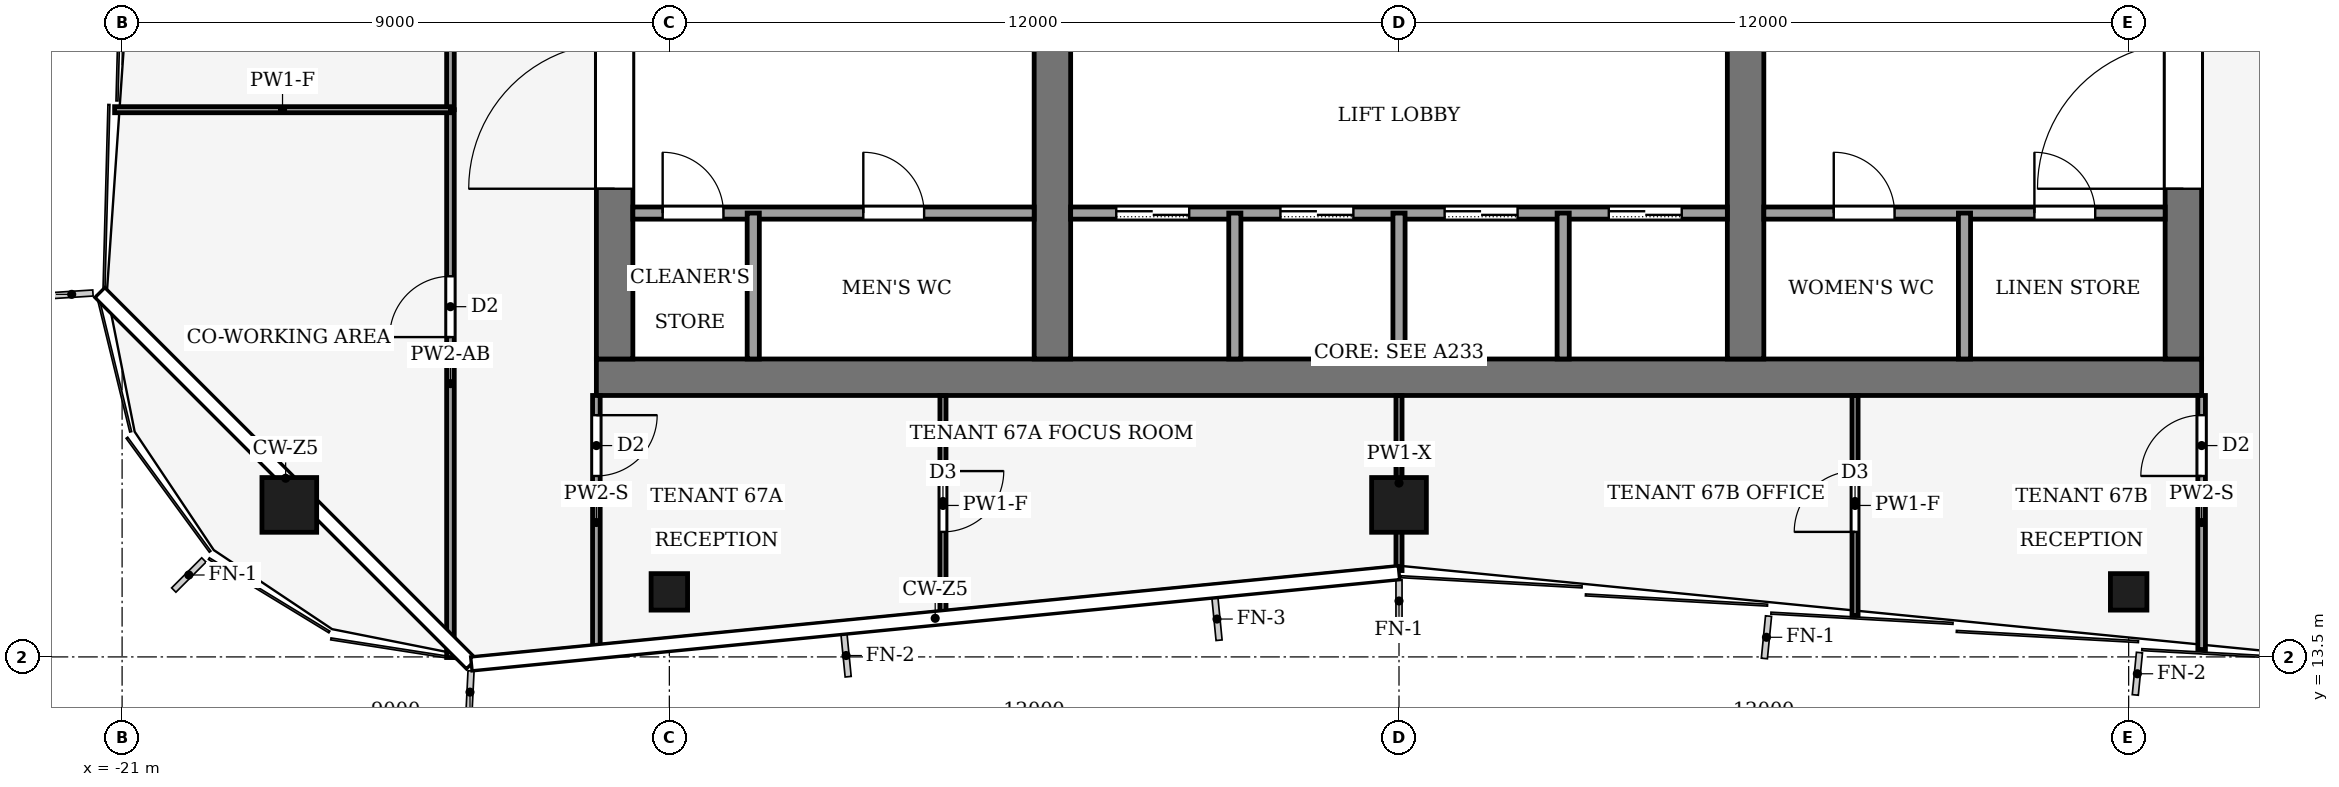
"""IFC4 building model, lengths in metres.
Left out: names, types, materials, properties, quantities, classifications, styles, units other than length and angle.
Written with IfcOpenShell. Run it as: python <this file> out.ifc"""

import sys

from ifc_helpers import new_model, si_unit, direction, frame, frame_2d, origin, origin_2d, place, context, subcontext, project, spatial, rectangle, hollow_rectangle, extrude, element, fill, save


model = new_model("IFC4")
c1 = context("Model", 3, precision=1e-05, world=origin(), true_north=direction((0.0, 1.0)))
c2 = subcontext(c1, "Body", "Model", "MODEL_VIEW")
j1 = project(units=[si_unit("LENGTHUNIT", "METRE"), si_unit("PLANEANGLEUNIT", "RADIAN")], contexts=[c1])
p1 = place(None, origin())
s1 = spatial("IfcSite", under=j1, at=p1, CompositionType="ELEMENT")
p2 = place(p1, origin())
s2 = spatial("IfcBuilding", under=s1, at=p2, CompositionType="ELEMENT")
p3 = place(p2, frame((0.0, 0.0, 294.0)))
s3 = spatial("IfcBuildingStorey", under=s2, at=p3, CompositionType="ELEMENT", Elevation=294.0)
p4 = place(p3, frame((-13.2, 18.1, -0.13), z_axis=(0.0, 0.0, 1.0), x_axis=(1.0, 0.0, 0.0)))
e1 = element("IfcWall", 1, at=p4, inside=s3, PredefinedType="SHEAR", context=c2, shape_type="SweptSolid", body=[
    extrude(rectangle(XDim=26.4, YDim=0.6, at=frame_2d((13.2, 0.0))), origin(), (0.0, 0.0, 1.0), 4.0),
])
p5 = place(p3, frame((-12.9, 18.4, -0.13), z_axis=(0.0, 0.0, 1.0), x_axis=(0.0, 1.0, 0.0)))
e2 = element("IfcWall", 2, at=p5, inside=s3, PredefinedType="SHEAR", context=c2, shape_type="SweptSolid", body=[
    extrude(rectangle(XDim=19.2, YDim=0.6, at=frame_2d((9.6, 0.0))), origin(), (0.0, 0.0, 1.0), 4.0),
])
p6 = place(p5, frame((2.8, 0.0, 0.13)))
e3 = element("IfcOpeningElement", 3, at=p6, cuts=e2, PredefinedType="OPENING", context=c2, shape_type="SweptSolid", body=[
    extrude(rectangle(XDim=2.4, YDim=2.4, at=frame_2d((1.2, 1.2))), frame((0.0, 0.31, 0.0), z_axis=(0.0, -1.0, 0.0), x_axis=(1.0, 0.0, 0.0)), (0.0, 0.0, 1.0), 0.62),
])
p7 = place(p5, frame((13.4, 0.0, 0.13)))
e4 = element("IfcOpeningElement", 4, at=p7, cuts=e2, PredefinedType="OPENING", context=c2, shape_type="SweptSolid", body=[
    extrude(rectangle(XDim=1.4, YDim=2.2, at=frame_2d((0.7, 1.1))), frame((0.0, 0.31, 0.0), z_axis=(0.0, -1.0, 0.0), x_axis=(1.0, 0.0, 0.0)), (0.0, 0.0, 1.0), 0.62),
])
p8 = place(p3, frame((12.9, 18.4, -0.13), z_axis=(0.0, 0.0, 1.0), x_axis=(0.0, 1.0, 0.0)))
e5 = element("IfcWall", 5, at=p8, inside=s3, PredefinedType="SHEAR", context=c2, shape_type="SweptSolid", body=[
    extrude(rectangle(XDim=19.2, YDim=0.6, at=frame_2d((9.6, 0.0))), origin(), (0.0, 0.0, 1.0), 4.0),
])
p9 = place(p8, frame((2.8, 0.0, 0.13)))
e6 = element("IfcOpeningElement", 6, at=p9, cuts=e5, PredefinedType="OPENING", context=c2, shape_type="SweptSolid", body=[
    extrude(rectangle(XDim=2.4, YDim=2.4, at=frame_2d((1.2, 1.2))), frame((0.0, 0.31, 0.0), z_axis=(0.0, -1.0, 0.0), x_axis=(1.0, 0.0, 0.0)), (0.0, 0.0, 1.0), 0.62),
])
p10 = place(p8, frame((13.3, 0.0, 0.13)))
e7 = element("IfcOpeningElement", 7, at=p10, cuts=e5, PredefinedType="OPENING", context=c2, shape_type="SweptSolid", body=[
    extrude(rectangle(XDim=2.4, YDim=2.4, at=frame_2d((1.2, 1.2))), frame((0.0, 0.31, 0.0), z_axis=(0.0, -1.0, 0.0), x_axis=(1.0, 0.0, 0.0)), (0.0, 0.0, 1.0), 0.62),
])
p11 = place(p3, frame((-5.7, 18.4, -0.13), z_axis=(0.0, 0.0, 1.0), x_axis=(0.0, 1.0, 0.0)))
e8 = element("IfcWall", 8, at=p11, inside=s3, PredefinedType="SHEAR", context=c2, shape_type="SweptSolid", body=[
    extrude(rectangle(XDim=19.2, YDim=0.6, at=frame_2d((9.6, 0.0))), origin(), (0.0, 0.0, 1.0), 4.0),
])
p12 = place(p11, frame((8.35, 0.0, 0.13)))
e9 = element("IfcOpeningElement", 9, at=p12, cuts=e8, PredefinedType="OPENING", context=c2, shape_type="SweptSolid", body=[
    extrude(rectangle(XDim=0.9, YDim=2.1, at=frame_2d((0.45, 1.05))), frame((0.0, 0.31, 0.0), z_axis=(0.0, -1.0, 0.0), x_axis=(1.0, 0.0, 0.0)), (0.0, 0.0, 1.0), 0.62),
])
p13 = place(p3, frame((5.7, 18.4, -0.13), z_axis=(0.0, 0.0, 1.0), x_axis=(0.0, 1.0, 0.0)))
e10 = element("IfcWall", 10, at=p13, inside=s3, PredefinedType="SHEAR", context=c2, shape_type="SweptSolid", body=[
    extrude(rectangle(XDim=19.2, YDim=0.6, at=frame_2d((9.6, 0.0))), origin(), (0.0, 0.0, 1.0), 4.0),
])
p14 = place(p13, frame((13.3, 0.0, 0.13)))
e11 = element("IfcOpeningElement", 11, at=p14, cuts=e10, PredefinedType="OPENING", context=c2, shape_type="SweptSolid", body=[
    extrude(rectangle(XDim=2.4, YDim=2.4, at=frame_2d((1.2, 1.2))), frame((0.0, 0.31, 0.0), z_axis=(0.0, -1.0, 0.0), x_axis=(1.0, 0.0, 0.0)), (0.0, 0.0, 1.0), 0.62),
])
for number, where, z_axis, x_axis in (
    (12, (0.0, 16.0, 0.0), (0.0, 0.0, 1.0), (1.0, 0.0, 0.0)),
    (13, (-18.25, 16.0, 0.0), (0.0, 0.0, 1.0), (1.0, 0.0, 0.0)),
):
    element("IfcColumn", number, at=place(p3, frame(where, z_axis=z_axis, x_axis=x_axis)), inside=s3, PredefinedType="COLUMN", context=c2, shape_type="SweptSolid", body=[
        extrude(hollow_rectangle(XDim=0.9, YDim=0.9, WallThickness=0.04, at=origin_2d()), origin(), (0.0, 0.0, 1.0), 4.0),
    ])
for number, where, z_axis, x_axis in (
    (14, (-12.0, 14.57, 0.0), (0.0, 0.0, 1.0), (1.0, 0.0, 0.0)),
    (15, (12.0, 14.57, 0.0), (0.0, 0.0, 1.0), (1.0, 0.0, 0.0)),
):
    element("IfcColumn", number, at=place(p3, frame(where, z_axis=z_axis, x_axis=x_axis)), inside=s3, PredefinedType="COLUMN", context=c2, shape_type="SweptSolid", body=[
        extrude(hollow_rectangle(XDim=0.6, YDim=0.6, WallThickness=0.025, at=origin_2d()), origin(), (0.0, 0.0, 1.0), 4.0),
    ])
p15 = place(p3, frame((-12.6, 20.8, 0.0), z_axis=(0.0, 0.0, 1.0), x_axis=(1.0, 0.0, 0.0)))
e16 = element("IfcWall", 16, at=p15, inside=s3, PredefinedType="PARTITIONING", context=c2, shape_type="SweptSolid", body=[
    extrude(rectangle(XDim=6.6, YDim=0.2, at=frame_2d((3.3, 0.0))), origin(), (0.0, 0.0, 1.0), 3.87),
])
p16 = place(p15, frame((0.49, 0.0, 0.0)))
e17 = element("IfcOpeningElement", 17, at=p16, cuts=e16, PredefinedType="OPENING", context=c2, shape_type="SweptSolid", body=[
    extrude(rectangle(XDim=1.0, YDim=2.1, at=frame_2d((0.5, 1.05))), frame((0.0, 0.11, 0.0), z_axis=(0.0, -1.0, 0.0), x_axis=(1.0, 0.0, 0.0)), (0.0, 0.0, 1.0), 0.22),
])
p17 = place(p15, frame((3.79, 0.0, 0.0)))
e18 = element("IfcOpeningElement", 18, at=p17, cuts=e16, PredefinedType="OPENING", context=c2, shape_type="SweptSolid", body=[
    extrude(rectangle(XDim=1.0, YDim=2.1, at=frame_2d((0.5, 1.05))), frame((0.0, 0.11, 0.0), z_axis=(0.0, -1.0, 0.0), x_axis=(1.0, 0.0, 0.0)), (0.0, 0.0, 1.0), 0.22),
])
p18 = place(p3, frame((-5.4, 20.8, 0.0), z_axis=(0.0, 0.0, 1.0), x_axis=(1.0, 0.0, 0.0)))
e19 = element("IfcWall", 19, at=p18, inside=s3, PredefinedType="PARTITIONING", context=c2, shape_type="SweptSolid", body=[
    extrude(rectangle(XDim=10.8, YDim=0.2, at=frame_2d((5.4, 0.0))), origin(), (0.0, 0.0, 1.0), 3.87),
])
p19 = place(p18, frame((0.75, 0.0, 0.0)))
e20 = element("IfcOpeningElement", 20, at=p19, cuts=e19, PredefinedType="OPENING", context=c2, shape_type="SweptSolid", body=[
    extrude(rectangle(XDim=1.2, YDim=2.2, at=frame_2d((0.6, 1.1))), frame((0.0, 0.11, 0.0), z_axis=(0.0, -1.0, 0.0), x_axis=(1.0, 0.0, 0.0)), (0.0, 0.0, 1.0), 0.22),
])
p20 = place(p18, frame((3.45, 0.0, 0.0)))
e21 = element("IfcOpeningElement", 21, at=p20, cuts=e19, PredefinedType="OPENING", context=c2, shape_type="SweptSolid", body=[
    extrude(rectangle(XDim=1.2, YDim=2.2, at=frame_2d((0.6, 1.1))), frame((0.0, 0.11, 0.0), z_axis=(0.0, -1.0, 0.0), x_axis=(1.0, 0.0, 0.0)), (0.0, 0.0, 1.0), 0.22),
])
p21 = place(p18, frame((6.15, 0.0, 0.0)))
e22 = element("IfcOpeningElement", 22, at=p21, cuts=e19, PredefinedType="OPENING", context=c2, shape_type="SweptSolid", body=[
    extrude(rectangle(XDim=1.2, YDim=2.2, at=frame_2d((0.6, 1.1))), frame((0.0, 0.11, 0.0), z_axis=(0.0, -1.0, 0.0), x_axis=(1.0, 0.0, 0.0)), (0.0, 0.0, 1.0), 0.22),
])
p22 = place(p18, frame((8.85, 0.0, 0.0)))
e23 = element("IfcOpeningElement", 23, at=p22, cuts=e19, PredefinedType="OPENING", context=c2, shape_type="SweptSolid", body=[
    extrude(rectangle(XDim=1.2, YDim=2.2, at=frame_2d((0.6, 1.1))), frame((0.0, 0.11, 0.0), z_axis=(0.0, -1.0, 0.0), x_axis=(1.0, 0.0, 0.0)), (0.0, 0.0, 1.0), 0.22),
])
p23 = place(p3, frame((6.0, 20.8, 0.0), z_axis=(0.0, 0.0, 1.0), x_axis=(1.0, 0.0, 0.0)))
e24 = element("IfcWall", 24, at=p23, inside=s3, PredefinedType="PARTITIONING", context=c2, shape_type="SweptSolid", body=[
    extrude(rectangle(XDim=6.6, YDim=0.2, at=frame_2d((3.3, 0.0))), origin(), (0.0, 0.0, 1.0), 3.87),
])
p24 = place(p23, frame((1.15, 0.0, 0.0)))
e25 = element("IfcOpeningElement", 25, at=p24, cuts=e24, PredefinedType="OPENING", context=c2, shape_type="SweptSolid", body=[
    extrude(rectangle(XDim=1.0, YDim=2.1, at=frame_2d((0.5, 1.05))), frame((0.0, 0.11, 0.0), z_axis=(0.0, -1.0, 0.0), x_axis=(1.0, 0.0, 0.0)), (0.0, 0.0, 1.0), 0.22),
])
p25 = place(p23, frame((4.45, 0.0, 0.0)))
e26 = element("IfcOpeningElement", 26, at=p25, cuts=e24, PredefinedType="OPENING", context=c2, shape_type="SweptSolid", body=[
    extrude(rectangle(XDim=1.0, YDim=2.1, at=frame_2d((0.5, 1.05))), frame((0.0, 0.11, 0.0), z_axis=(0.0, -1.0, 0.0), x_axis=(1.0, 0.0, 0.0)), (0.0, 0.0, 1.0), 0.22),
])
for number, where, z_axis, x_axis in (
    (27, (-10.62, 18.4, 0.0), (0.0, 0.0, 1.0), (0.0, 1.0, 0.0)),
    (28, (-2.7, 18.4, 0.0), (0.0, 0.0, 1.0), (0.0, 1.0, 0.0)),
    (29, (0.0, 18.4, 0.0), (0.0, 0.0, 1.0), (0.0, 1.0, 0.0)),
    (30, (2.7, 18.4, 0.0), (0.0, 0.0, 1.0), (0.0, 1.0, 0.0)),
    (31, (9.3, 18.4, 0.0), (0.0, 0.0, 1.0), (0.0, 1.0, 0.0)),
):
    element("IfcWall", number, at=place(p3, frame(where, z_axis=z_axis, x_axis=x_axis)), inside=s3, PredefinedType="PARTITIONING", context=c2, shape_type="SweptSolid", body=[
        extrude(rectangle(XDim=2.4, YDim=0.2, at=frame_2d((1.2, 0.0))), origin(), (0.0, 0.0, 1.0), 3.87),
    ])
p26 = place(p3, frame((-15.6, 13.49, 0.0), z_axis=(0.0, 0.0, 1.0), x_axis=(0.0, 1.0, 0.0)))
e32 = element("IfcWall", 32, at=p26, inside=s3, PredefinedType="PARTITIONING", context=c2, shape_type="SweptSolid", body=[
    extrude(rectangle(XDim=9.01, YDim=0.125, at=frame_2d((4.505, 0.0))), origin(), (0.0, 0.0, 1.0), 2.93),
])
p27 = place(p26, frame((5.271, 0.0, 0.0)))
e33 = element("IfcOpeningElement", 33, at=p27, cuts=e32, PredefinedType="OPENING", context=c2, shape_type="SweptSolid", body=[
    extrude(rectangle(XDim=1.0, YDim=2.1, at=frame_2d((0.5, 1.05))), frame((0.0, 0.073, 0.0), z_axis=(0.0, -1.0, 0.0), x_axis=(1.0, 0.0, 0.0)), (0.0, 0.0, 1.0), 0.145),
])
p28 = place(p3, frame((-15.6, 22.5, 0.0), z_axis=(0.0, 0.0, 1.0), x_axis=(0.0, 1.0, 0.0)))
e34 = element("IfcWall", 34, at=p28, inside=s3, PredefinedType="PARTITIONING", context=c2, shape_type="SweptSolid", body=[
    extrude(rectangle(XDim=12.0, YDim=0.125, at=frame_2d((6.0, 0.0))), origin(), (0.0, 0.0, 1.0), 3.54),
])
p29 = place(p28, frame((5.5, 0.0, 0.0)))
e35 = element("IfcOpeningElement", 35, at=p29, cuts=e34, PredefinedType="OPENING", context=c2, shape_type="SweptSolid", body=[
    extrude(rectangle(XDim=1.0, YDim=2.1, at=frame_2d((0.5, 1.05))), frame((0.0, 0.073, 0.0), z_axis=(0.0, -1.0, 0.0), x_axis=(1.0, 0.0, 0.0)), (0.0, 0.0, 1.0), 0.145),
])
p30 = place(p3, frame((-13.2, 17.8, 0.0), z_axis=(0.0, 0.0, 1.0), x_axis=(0.0, -1.0, 0.0)))
e36 = element("IfcWall", 36, at=p30, inside=s3, PredefinedType="PARTITIONING", context=c2, shape_type="SweptSolid", body=[
    extrude(rectangle(XDim=4.178, YDim=0.125, at=frame_2d((2.089, 0.0))), origin(), (0.0, 0.0, 1.0), 3.04),
])
p31 = place(p30, frame((0.324, 0.0, 0.0)))
e37 = element("IfcOpeningElement", 37, at=p31, cuts=e36, PredefinedType="OPENING", context=c2, shape_type="SweptSolid", body=[
    extrude(rectangle(XDim=1.0, YDim=2.1, at=frame_2d((0.5, 1.05))), frame((0.0, 0.073, 0.0), z_axis=(0.0, -1.0, 0.0), x_axis=(1.0, 0.0, 0.0)), (0.0, 0.0, 1.0), 0.145),
])
p32 = place(p3, frame((13.2, 13.622, 0.0), z_axis=(0.0, 0.0, 1.0), x_axis=(0.0, 1.0, 0.0)))
e38 = element("IfcWall", 38, at=p32, inside=s3, PredefinedType="PARTITIONING", context=c2, shape_type="SweptSolid", body=[
    extrude(rectangle(XDim=4.178, YDim=0.125, at=frame_2d((2.089, 0.0))), origin(), (0.0, 0.0, 1.0), 3.04),
])
p33 = place(p32, frame((2.854, 0.0, 0.0)))
e39 = element("IfcOpeningElement", 39, at=p33, cuts=e38, PredefinedType="OPENING", context=c2, shape_type="SweptSolid", body=[
    extrude(rectangle(XDim=1.0, YDim=2.1, at=frame_2d((0.5, 1.05))), frame((0.0, 0.073, 0.0), z_axis=(0.0, -1.0, 0.0), x_axis=(1.0, 0.0, 0.0)), (0.0, 0.0, 1.0), 0.145),
])
p34 = place(p3, frame((-15.6, 22.5, 0.0), z_axis=(0.0, 0.0, 1.0), x_axis=(-1.0, 0.0, 0.0)))
e40 = element("IfcWall", 40, at=p34, inside=s3, PredefinedType="PARTITIONING", context=c2, shape_type="SweptSolid", body=[
    extrude(rectangle(XDim=5.523, YDim=0.1, at=frame_2d((2.761, 0.0))), origin(), (0.0, 0.0, 1.0), 3.04),
])
p35 = place(p3, frame((-7.5, 17.8, 0.0), z_axis=(0.0, 0.0, 1.0), x_axis=(0.0, -1.0, 0.0)))
e41 = element("IfcWall", 41, at=p35, inside=s3, PredefinedType="PARTITIONING", context=c2, shape_type="SweptSolid", body=[
    extrude(rectangle(XDim=3.618, YDim=0.1, at=frame_2d((1.809, 0.0))), origin(), (0.0, 0.0, 1.0), 3.04),
])
p36 = place(p35, frame((1.244, 0.0, 0.0)))
e42 = element("IfcOpeningElement", 42, at=p36, cuts=e41, PredefinedType="OPENING", context=c2, shape_type="SweptSolid", body=[
    extrude(rectangle(XDim=1.0, YDim=2.1, at=frame_2d((0.5, 1.05))), frame((0.0, 0.06, 0.0), z_axis=(0.0, -1.0, 0.0), x_axis=(1.0, 0.0, 0.0)), (0.0, 0.0, 1.0), 0.12),
])
p37 = place(p3, frame((0.0, 14.92, 0.0), z_axis=(0.0, 0.0, 1.0), x_axis=(0.0, 1.0, 0.0)))
e43 = element("IfcWall", 43, at=p37, inside=s3, PredefinedType="PARTITIONING", context=c2, shape_type="SweptSolid", body=[
    extrude(rectangle(XDim=2.88, YDim=0.1, at=frame_2d((1.44, 0.0))), origin(), (0.0, 0.0, 1.0), 3.54),
])
p38 = place(p3, frame((7.5, 14.182, 0.0), z_axis=(0.0, 0.0, 1.0), x_axis=(0.0, 1.0, 0.0)))
e44 = element("IfcWall", 44, at=p38, inside=s3, PredefinedType="PARTITIONING", context=c2, shape_type="SweptSolid", body=[
    extrude(rectangle(XDim=3.618, YDim=0.1, at=frame_2d((1.809, 0.0))), origin(), (0.0, 0.0, 1.0), 3.04),
])
p39 = place(p38, frame((1.374, 0.0, 0.0)))
e45 = element("IfcOpeningElement", 45, at=p39, cuts=e44, PredefinedType="OPENING", context=c2, shape_type="SweptSolid", body=[
    extrude(rectangle(XDim=1.0, YDim=2.1, at=frame_2d((0.5, 1.05))), frame((0.0, 0.06, 0.0), z_axis=(0.0, -1.0, 0.0), x_axis=(1.0, 0.0, 0.0)), (0.0, 0.0, 1.0), 0.12),
])
p40 = place(p19, origin())
e46 = element("IfcDoor", 46, at=p40, inside=s3, OperationType="SLIDING_TO_LEFT", PredefinedType="DOOR", context=c2, shape_type="SweptSolid", body=[
    extrude(rectangle(XDim=1.2, YDim=2.2, at=frame_2d((0.6, 1.1))), frame((0.0, 0.025, 0.0), z_axis=(0.0, -1.0, 0.0), x_axis=(1.0, 0.0, 0.0)), (0.0, 0.0, 1.0), 0.05),
])
fill(e20, e46)
p41 = place(p20, origin())
e47 = element("IfcDoor", 47, at=p41, inside=s3, OperationType="SLIDING_TO_LEFT", PredefinedType="DOOR", context=c2, shape_type="SweptSolid", body=[
    extrude(rectangle(XDim=1.2, YDim=2.2, at=frame_2d((0.6, 1.1))), frame((0.0, 0.025, 0.0), z_axis=(0.0, -1.0, 0.0), x_axis=(1.0, 0.0, 0.0)), (0.0, 0.0, 1.0), 0.05),
])
fill(e21, e47)
p42 = place(p21, origin())
e48 = element("IfcDoor", 48, at=p42, inside=s3, OperationType="SLIDING_TO_LEFT", PredefinedType="DOOR", context=c2, shape_type="SweptSolid", body=[
    extrude(rectangle(XDim=1.2, YDim=2.2, at=frame_2d((0.6, 1.1))), frame((0.0, 0.025, 0.0), z_axis=(0.0, -1.0, 0.0), x_axis=(1.0, 0.0, 0.0)), (0.0, 0.0, 1.0), 0.05),
])
fill(e22, e48)
p43 = place(p22, origin())
e49 = element("IfcDoor", 49, at=p43, inside=s3, OperationType="SLIDING_TO_LEFT", PredefinedType="DOOR", context=c2, shape_type="SweptSolid", body=[
    extrude(rectangle(XDim=1.2, YDim=2.2, at=frame_2d((0.6, 1.1))), frame((0.0, 0.025, 0.0), z_axis=(0.0, -1.0, 0.0), x_axis=(1.0, 0.0, 0.0)), (0.0, 0.0, 1.0), 0.05),
])
fill(e23, e49)
p44 = place(p16, origin())
e50 = element("IfcDoor", 50, at=p44, inside=s3, OperationType="SINGLE_SWING_RIGHT", PredefinedType="DOOR", context=c2, shape_type="SweptSolid", body=[
    extrude(rectangle(XDim=1.0, YDim=2.1, at=frame_2d((0.5, 1.05))), frame((0.0, 0.025, 0.0), z_axis=(0.0, -1.0, 0.0), x_axis=(1.0, 0.0, 0.0)), (0.0, 0.0, 1.0), 0.05),
])
fill(e17, e50)
p45 = place(p17, origin())
e51 = element("IfcDoor", 51, at=p45, inside=s3, OperationType="SINGLE_SWING_RIGHT", PredefinedType="DOOR", context=c2, shape_type="SweptSolid", body=[
    extrude(rectangle(XDim=1.0, YDim=2.1, at=frame_2d((0.5, 1.05))), frame((0.0, 0.025, 0.0), z_axis=(0.0, -1.0, 0.0), x_axis=(1.0, 0.0, 0.0)), (0.0, 0.0, 1.0), 0.05),
])
fill(e18, e51)
p46 = place(p24, origin())
e52 = element("IfcDoor", 52, at=p46, inside=s3, OperationType="SINGLE_SWING_LEFT", PredefinedType="DOOR", context=c2, shape_type="SweptSolid", body=[
    extrude(rectangle(XDim=1.0, YDim=2.1, at=frame_2d((0.5, 1.05))), frame((0.0, 0.025, 0.0), z_axis=(0.0, -1.0, 0.0), x_axis=(1.0, 0.0, 0.0)), (0.0, 0.0, 1.0), 0.05),
])
fill(e25, e52)
p47 = place(p25, origin())
e53 = element("IfcDoor", 53, at=p47, inside=s3, OperationType="SINGLE_SWING_LEFT", PredefinedType="DOOR", context=c2, shape_type="SweptSolid", body=[
    extrude(rectangle(XDim=1.0, YDim=2.1, at=frame_2d((0.5, 1.05))), frame((0.0, 0.025, 0.0), z_axis=(0.0, -1.0, 0.0), x_axis=(1.0, 0.0, 0.0)), (0.0, 0.0, 1.0), 0.05),
])
fill(e26, e53)
p48 = place(p6, origin())
e54 = element("IfcDoor", 54, at=p48, inside=s3, OperationType="DOUBLE_DOOR_SINGLE_SWING", PredefinedType="DOOR", context=c2, shape_type="SweptSolid", body=[
    extrude(rectangle(XDim=2.4, YDim=2.4, at=frame_2d((1.2, 1.2))), frame((0.0, 0.025, 0.0), z_axis=(0.0, -1.0, 0.0), x_axis=(1.0, 0.0, 0.0)), (0.0, 0.0, 1.0), 0.05),
])
fill(e3, e54)
p49 = place(p9, origin())
e55 = element("IfcDoor", 55, at=p49, inside=s3, OperationType="DOUBLE_DOOR_SINGLE_SWING", PredefinedType="DOOR", context=c2, shape_type="SweptSolid", body=[
    extrude(rectangle(XDim=2.4, YDim=2.4, at=frame_2d((1.2, 1.2))), frame((0.0, 0.025, 0.0), z_axis=(0.0, -1.0, 0.0), x_axis=(1.0, 0.0, 0.0)), (0.0, 0.0, 1.0), 0.05),
])
fill(e6, e55)
p50 = place(p27, origin())
e56 = element("IfcDoor", 56, at=p50, inside=s3, OperationType="SINGLE_SWING_RIGHT", PredefinedType="DOOR", context=c2, shape_type="SweptSolid", body=[
    extrude(rectangle(XDim=1.0, YDim=2.1, at=frame_2d((0.5, 1.05))), frame((0.0, 0.025, 0.0), z_axis=(0.0, -1.0, 0.0), x_axis=(1.0, 0.0, 0.0)), (0.0, 0.0, 1.0), 0.05),
])
fill(e33, e56)
p51 = place(p31, origin())
e57 = element("IfcDoor", 57, at=p51, inside=s3, OperationType="SINGLE_SWING_LEFT", PredefinedType="DOOR", context=c2, shape_type="SweptSolid", body=[
    extrude(rectangle(XDim=1.0, YDim=2.1, at=frame_2d((0.5, 1.05))), frame((0.0, 0.025, 0.0), z_axis=(0.0, -1.0, 0.0), x_axis=(1.0, 0.0, 0.0)), (0.0, 0.0, 1.0), 0.05),
])
fill(e37, e57)
p52 = place(p33, origin())
e58 = element("IfcDoor", 58, at=p52, inside=s3, OperationType="SINGLE_SWING_RIGHT", PredefinedType="DOOR", context=c2, shape_type="SweptSolid", body=[
    extrude(rectangle(XDim=1.0, YDim=2.1, at=frame_2d((0.5, 1.05))), frame((0.0, 0.025, 0.0), z_axis=(0.0, -1.0, 0.0), x_axis=(1.0, 0.0, 0.0)), (0.0, 0.0, 1.0), 0.05),
])
fill(e39, e58)
p53 = place(p36, origin())
e59 = element("IfcDoor", 59, at=p53, inside=s3, OperationType="SINGLE_SWING_LEFT", PredefinedType="DOOR", context=c2, shape_type="SweptSolid", body=[
    extrude(rectangle(XDim=1.0, YDim=2.1, at=frame_2d((0.5, 1.05))), frame((0.0, 0.025, 0.0), z_axis=(0.0, -1.0, 0.0), x_axis=(1.0, 0.0, 0.0)), (0.0, 0.0, 1.0), 0.05),
])
fill(e42, e59)
p54 = place(p39, origin())
e60 = element("IfcDoor", 60, at=p54, inside=s3, OperationType="SINGLE_SWING_RIGHT", PredefinedType="DOOR", context=c2, shape_type="SweptSolid", body=[
    extrude(rectangle(XDim=1.0, YDim=2.1, at=frame_2d((0.5, 1.05))), frame((0.0, 0.025, 0.0), z_axis=(0.0, -1.0, 0.0), x_axis=(1.0, 0.0, 0.0)), (0.0, 0.0, 1.0), 0.05),
])
fill(e45, e60)
save(model, sys.argv[1])
